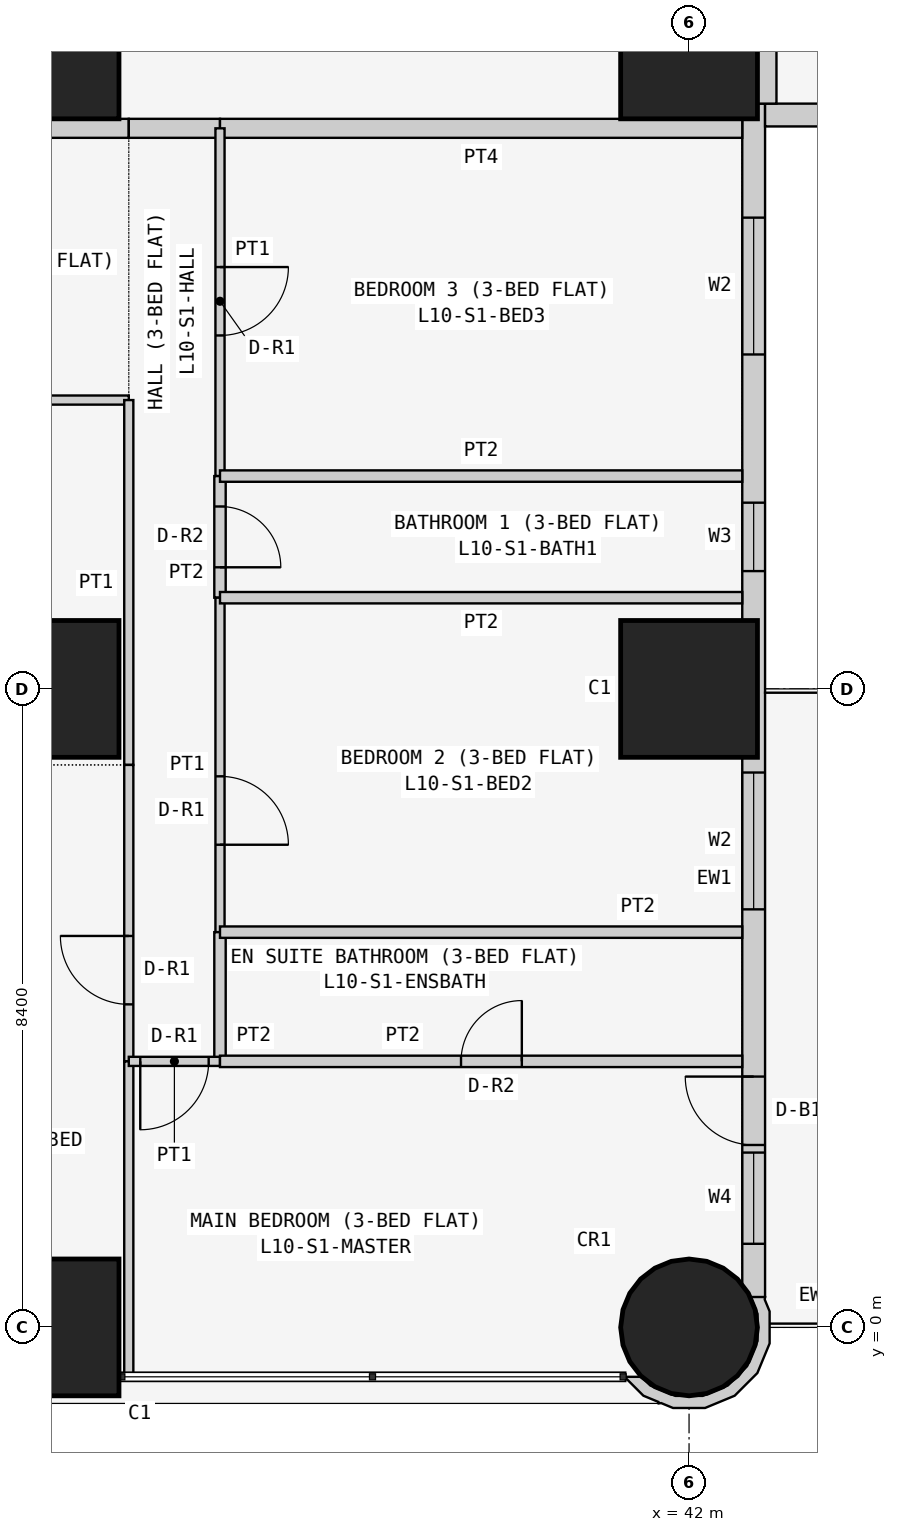
"""IFC4 building model, lengths in metres.
Left out: names, types, materials, properties, quantities, classifications, styles, units other than length and angle.
Written with IfcOpenShell. Run it as: python <this file> out.ifc"""

import sys

from ifc_helpers import new_model, si_unit, direction, frame, frame_2d, origin, origin_2d, place, context, subcontext, project, spatial, polyline, rectangle, circle, outline, extrude, element, fill, save


model = new_model("IFC4")
c1 = context("Model", 3, precision=1e-05, world=origin(), true_north=direction((0.0, 1.0)))
c2 = subcontext(c1, "Body", "Model", "MODEL_VIEW")
j1 = project(units=[si_unit("LENGTHUNIT", "METRE"), si_unit("PLANEANGLEUNIT", "RADIAN")], contexts=[c1])
p1 = place(None, origin())
s1 = spatial("IfcSite", under=j1, at=p1, CompositionType="ELEMENT")
p2 = place(p1, origin())
s2 = spatial("IfcBuilding", under=s1, at=p2, CompositionType="ELEMENT")
p3 = place(p2, frame((0.0, 0.0, 45.3)))
s3 = spatial("IfcBuildingStorey", under=s2, at=p3, CompositionType="ELEMENT", Elevation=45.3)
for number, where, z_axis, x_axis in (
    (1, (33.6, 0.0, 0.0), (0.0, 0.0, 1.0), (1.0, 0.0, 0.0)),
    (2, (33.6, 8.4, 0.0), (0.0, 0.0, 1.0), (1.0, 0.0, 0.0)),
    (3, (33.6, 16.8, 0.0), (0.0, 0.0, 1.0), (1.0, 0.0, 0.0)),
):
    element("IfcColumn", number, at=place(p3, frame(where, z_axis=z_axis, x_axis=x_axis)), inside=s3, PredefinedType="COLUMN", context=c2, shape_type="SweptSolid", body=[
        extrude(rectangle(XDim=1.8, YDim=1.8, at=origin_2d()), origin(), (0.0, 0.0, 1.0), 3.6),
    ])
p4 = place(p3, frame((42.0, 0.0, 0.0), z_axis=(0.0, 0.0, 1.0), x_axis=(1.0, 0.0, 0.0)))
e4 = element("IfcColumn", 4, at=p4, inside=s3, PredefinedType="COLUMN", context=c2, shape_type="SweptSolid", body=[
    extrude(circle(Radius=0.9, at=origin_2d()), origin(), (0.0, 0.0, 1.0), 3.6),
])
for number, where, z_axis, x_axis in (
    (5, (42.0, 8.4, 0.0), (0.0, 0.0, 1.0), (1.0, 0.0, 0.0)),
    (6, (42.0, 16.8, 0.0), (0.0, 0.0, 1.0), (1.0, 0.0, 0.0)),
):
    element("IfcColumn", number, at=place(p3, frame(where, z_axis=z_axis, x_axis=x_axis)), inside=s3, PredefinedType="COLUMN", context=c2, shape_type="SweptSolid", body=[
        extrude(rectangle(XDim=1.8, YDim=1.8, at=origin_2d()), origin(), (0.0, 0.0, 1.0), 3.6),
    ])
p5 = place(p3, frame((42.85, 0.4, 0.0), z_axis=(0.0, 0.0, 1.0), x_axis=(0.0, 1.0, 0.0)))
e7 = element("IfcWall", 7, at=p5, inside=s3, PredefinedType="SOLIDWALL", context=c2, shape_type="SweptSolid", body=[
    extrude(rectangle(XDim=15.7, YDim=0.3, at=frame_2d((7.85, 0.0))), origin(), (0.0, 0.0, 1.0), 3.45),
])
p6 = place(p5, frame((12.4, 0.0, 0.9)))
e8 = element("IfcOpeningElement", 8, at=p6, cuts=e7, PredefinedType="OPENING", context=c2, shape_type="SweptSolid", body=[
    extrude(rectangle(XDim=1.8, YDim=1.5, at=frame_2d((0.9, 0.75))), frame((0.0, 0.16, 0.0), z_axis=(0.0, -1.0, 0.0), x_axis=(1.0, 0.0, 0.0)), (0.0, 0.0, 1.0), 0.32),
])
p7 = place(p5, frame((9.55, 0.0, 1.5)))
e9 = element("IfcOpeningElement", 9, at=p7, cuts=e7, PredefinedType="OPENING", context=c2, shape_type="SweptSolid", body=[
    extrude(rectangle(XDim=0.9, YDim=0.7, at=frame_2d((0.45, 0.35))), frame((0.0, 0.16, 0.0), z_axis=(0.0, -1.0, 0.0), x_axis=(1.0, 0.0, 0.0)), (0.0, 0.0, 1.0), 0.32),
])
p8 = place(p5, frame((5.1, 0.0, 0.9)))
e10 = element("IfcOpeningElement", 10, at=p8, cuts=e7, PredefinedType="OPENING", context=c2, shape_type="SweptSolid", body=[
    extrude(rectangle(XDim=1.8, YDim=1.5, at=frame_2d((0.9, 0.75))), frame((0.0, 0.16, 0.0), z_axis=(0.0, -1.0, 0.0), x_axis=(1.0, 0.0, 0.0)), (0.0, 0.0, 1.0), 0.32),
])
p9 = place(p5, frame((2.0, 0.0, 0.0)))
e11 = element("IfcOpeningElement", 11, at=p9, cuts=e7, PredefinedType="OPENING", context=c2, shape_type="SweptSolid", body=[
    extrude(rectangle(XDim=0.9, YDim=2.4, at=frame_2d((0.45, 1.2))), frame((0.0, 0.16, 0.0), z_axis=(0.0, -1.0, 0.0), x_axis=(1.0, 0.0, 0.0)), (0.0, 0.0, 1.0), 0.32),
])
p10 = place(p5, frame((0.7, 0.0, 0.9)))
e12 = element("IfcOpeningElement", 12, at=p10, cuts=e7, PredefinedType="OPENING", context=c2, shape_type="SweptSolid", body=[
    extrude(rectangle(XDim=1.2, YDim=1.5, at=frame_2d((0.6, 0.75))), frame((0.0, 0.16, 0.0), z_axis=(0.0, -1.0, 0.0), x_axis=(1.0, 0.0, 0.0)), (0.0, 0.0, 1.0), 0.32),
])
p11 = place(p3, frame((43.0, 15.95, 0.0), z_axis=(0.0, 0.0, 1.0), x_axis=(1.0, 0.0, 0.0)))
e13 = element("IfcWall", 13, at=p11, inside=s3, PredefinedType="SOLIDWALL", context=c2, shape_type="SweptSolid", body=[
    extrude(rectangle(XDim=15.4, YDim=0.3, at=frame_2d((7.7, 0.0))), origin(), (0.0, 0.0, 1.0), 3.45),
])
p12 = place(p11, frame((1.2, 0.0, 0.9)))
e14 = element("IfcOpeningElement", 14, at=p12, cuts=e13, PredefinedType="OPENING", context=c2, shape_type="SweptSolid", body=[
    extrude(rectangle(XDim=1.8, YDim=1.5, at=frame_2d((0.9, 0.75))), frame((0.0, 0.16, 0.0), z_axis=(0.0, -1.0, 0.0), x_axis=(1.0, 0.0, 0.0)), (0.0, 0.0, 1.0), 0.32),
])
p13 = place(p11, frame((4.95, 0.0, 1.5)))
e15 = element("IfcOpeningElement", 15, at=p13, cuts=e13, PredefinedType="OPENING", context=c2, shape_type="SweptSolid", body=[
    extrude(rectangle(XDim=0.9, YDim=0.7, at=frame_2d((0.45, 0.35))), frame((0.0, 0.16, 0.0), z_axis=(0.0, -1.0, 0.0), x_axis=(1.0, 0.0, 0.0)), (0.0, 0.0, 1.0), 0.32),
])
p14 = place(p11, frame((8.5, 0.0, 0.9)))
e16 = element("IfcOpeningElement", 16, at=p14, cuts=e13, PredefinedType="OPENING", context=c2, shape_type="SweptSolid", body=[
    extrude(rectangle(XDim=1.8, YDim=1.5, at=frame_2d((0.9, 0.75))), frame((0.0, 0.16, 0.0), z_axis=(0.0, -1.0, 0.0), x_axis=(1.0, 0.0, 0.0)), (0.0, 0.0, 1.0), 0.32),
])
p15 = place(p11, frame((12.5, 0.0, 0.0)))
e17 = element("IfcOpeningElement", 17, at=p15, cuts=e13, PredefinedType="OPENING", context=c2, shape_type="SweptSolid", body=[
    extrude(rectangle(XDim=0.9, YDim=2.4, at=frame_2d((0.45, 1.2))), frame((0.0, 0.16, 0.0), z_axis=(0.0, -1.0, 0.0), x_axis=(1.0, 0.0, 0.0)), (0.0, 0.0, 1.0), 0.32),
])
p16 = place(p11, frame((13.5, 0.0, 0.9)))
e18 = element("IfcOpeningElement", 18, at=p16, cuts=e13, PredefinedType="OPENING", context=c2, shape_type="SweptSolid", body=[
    extrude(rectangle(XDim=1.2, YDim=1.5, at=frame_2d((0.6, 0.75))), frame((0.0, 0.16, 0.0), z_axis=(0.0, -1.0, 0.0), x_axis=(1.0, 0.0, 0.0)), (0.0, 0.0, 1.0), 0.32),
])
p17 = place(p3, frame((41.233, -0.611, 0.0), z_axis=(0.0, 0.0, 1.0), x_axis=(0.377204953059, -0.926129809145, 0.0)))
e19 = element("IfcWall", 19, at=p17, inside=s3, PredefinedType="SOLIDWALL", context=c2, shape_type="SweptSolid", body=[
    extrude(outline(polyline([(0.319, 1.843), (-0.072, 2.001), (-0.24, 2.001), (-0.269, 2.017), (-0.37, 1.841), (-0.102, 1.842), (0.23, 1.707), (0.485, 1.455), (0.624, 1.125), (0.626, 0.766), (0.49, 0.434), (0.239, 0.179), (0.09, 0.117), (0.011, -0.078), (0.024, -0.083), (0.33, 0.045), (0.48, 0.197), (0.499, 0.193), (0.508, 0.225), (0.626, 0.345), (0.785, 0.736), (0.782, 1.157), (0.619, 1.546), (0.319, 1.843)])), origin(), (0.0, 0.0, 1.0), 3.45),
])
p18 = place(p3, frame((43.025, 22.971, 0.0), z_axis=(0.0, 0.0, 1.0), x_axis=(0.0, -1.0, 0.0)))
e20 = element("IfcWall", 20, at=p18, inside=s3, PredefinedType="PARTITIONING", context=c2, shape_type="SweptSolid", body=[
    extrude(rectangle(XDim=6.871, YDim=0.25, at=frame_2d((3.436, 0.0))), origin(), (0.0, 0.0, 1.0), 3.45),
])
p19 = place(p3, frame((34.629, 15.775, 0.0), z_axis=(0.0, 0.0, 1.0), x_axis=(-1.0, 0.0, 0.0)))
e21 = element("IfcWall", 21, at=p19, inside=s3, PredefinedType="PARTITIONING", context=c2, shape_type="SweptSolid", body=[
    extrude(rectangle(XDim=5.229, YDim=0.25, at=frame_2d((2.615, 0.0))), origin(), (0.0, 0.0, 1.0), 3.45),
])
p20 = place(p19, frame((2.129, 0.0, 0.0)))
e22 = element("IfcOpeningElement", 22, at=p20, cuts=e21, PredefinedType="OPENING", context=c2, shape_type="SweptSolid", body=[
    extrude(rectangle(XDim=1.0, YDim=2.1, at=frame_2d((0.5, 1.05))), frame((0.0, 0.135, 0.0), z_axis=(0.0, -1.0, 0.0), x_axis=(1.0, 0.0, 0.0)), (0.0, 0.0, 1.0), 0.27),
])
p21 = place(p3, frame((35.829, 15.775, 0.0), z_axis=(0.0, 0.0, 1.0), x_axis=(-1.0, 0.0, 0.0)))
e23 = element("IfcWall", 23, at=p21, inside=s3, PredefinedType="PARTITIONING", context=c2, shape_type="SweptSolid", body=[
    extrude(rectangle(XDim=1.2, YDim=0.25, at=frame_2d((0.6, 0.0))), origin(), (0.0, 0.0, 1.0), 3.45),
])
p22 = place(p3, frame((42.7, 15.775, 0.0), z_axis=(0.0, 0.0, 1.0), x_axis=(-1.0, 0.0, 0.0)))
e24 = element("IfcWall", 24, at=p22, inside=s3, PredefinedType="PARTITIONING", context=c2, shape_type="SweptSolid", body=[
    extrude(rectangle(XDim=6.871, YDim=0.25, at=frame_2d((3.436, 0.0))), origin(), (0.0, 0.0, 1.0), 3.45),
])
p23 = place(p3, frame((29.4, 12.2, 0.0), z_axis=(0.0, 0.0, 1.0), x_axis=(1.0, 0.0, 0.0)))
e25 = element("IfcWall", 25, at=p23, inside=s3, PredefinedType="PARTITIONING", context=c2, shape_type="SweptSolid", body=[
    extrude(rectangle(XDim=5.229, YDim=0.12, at=frame_2d((2.615, 0.0))), origin(), (0.0, 0.0, 1.0), 3.45),
])
p24 = place(p23, frame((1.05, 0.0, 0.0)))
e26 = element("IfcOpeningElement", 26, at=p24, cuts=e25, PredefinedType="OPENING", context=c2, shape_type="SweptSolid", body=[
    extrude(rectangle(XDim=0.9, YDim=2.1, at=frame_2d((0.45, 1.05))), frame((0.0, 0.07, 0.0), z_axis=(0.0, -1.0, 0.0), x_axis=(1.0, 0.0, 0.0)), (0.0, 0.0, 1.0), 0.14),
])
p25 = place(p3, frame((34.629, 7.4, 0.0), z_axis=(0.0, 0.0, 1.0), x_axis=(0.0, 1.0, 0.0)))
e27 = element("IfcWall", 27, at=p25, inside=s3, PredefinedType="PARTITIONING", context=c2, shape_type="SweptSolid", body=[
    extrude(rectangle(XDim=4.8, YDim=0.12, at=frame_2d((2.4, 0.0))), origin(), (0.0, 0.0, 1.0), 3.45),
])
p26 = place(p3, frame((34.629, 3.5, 0.0), z_axis=(0.0, 0.0, 1.0), x_axis=(0.0, 1.0, 0.0)))
e28 = element("IfcWall", 28, at=p26, inside=s3, PredefinedType="PARTITIONING", context=c2, shape_type="SweptSolid", body=[
    extrude(rectangle(XDim=3.9, YDim=0.12, at=frame_2d((1.95, 0.0))), origin(), (0.0, 0.0, 1.0), 3.45),
])
p27 = place(p26, frame((0.75, 0.0, 0.0)))
e29 = element("IfcOpeningElement", 29, at=p27, cuts=e28, PredefinedType="OPENING", context=c2, shape_type="SweptSolid", body=[
    extrude(rectangle(XDim=0.9, YDim=2.1, at=frame_2d((0.45, 1.05))), frame((0.0, 0.07, 0.0), z_axis=(0.0, -1.0, 0.0), x_axis=(1.0, 0.0, 0.0)), (0.0, 0.0, 1.0), 0.14),
])
p28 = place(p3, frame((34.629, -0.65, 0.0), z_axis=(0.0, 0.0, 1.0), x_axis=(0.0, 1.0, 0.0)))
e30 = element("IfcWall", 30, at=p28, inside=s3, PredefinedType="PARTITIONING", context=c2, shape_type="SweptSolid", body=[
    extrude(rectangle(XDim=4.15, YDim=0.12, at=frame_2d((2.075, 0.0))), origin(), (0.0, 0.0, 1.0), 3.45),
])
p29 = place(p3, frame((35.829, 11.2, 0.0), z_axis=(0.0, 0.0, 1.0), x_axis=(0.0, 1.0, 0.0)))
e31 = element("IfcWall", 31, at=p29, inside=s3, PredefinedType="PARTITIONING", context=c2, shape_type="SweptSolid", body=[
    extrude(rectangle(XDim=4.575, YDim=0.12, at=frame_2d((2.288, 0.0))), origin(), (0.0, 0.0, 1.0), 3.45),
])
p30 = place(p29, frame((1.85, 0.0, 0.0)))
e32 = element("IfcOpeningElement", 32, at=p30, cuts=e31, PredefinedType="OPENING", context=c2, shape_type="SweptSolid", body=[
    extrude(rectangle(XDim=0.9, YDim=2.1, at=frame_2d((0.45, 1.05))), frame((0.0, 0.07, 0.0), z_axis=(0.0, -1.0, 0.0), x_axis=(1.0, 0.0, 0.0)), (0.0, 0.0, 1.0), 0.14),
])
p31 = place(p3, frame((35.829, 9.6, 0.0), z_axis=(0.0, 0.0, 1.0), x_axis=(0.0, 1.0, 0.0)))
e33 = element("IfcWall", 33, at=p31, inside=s3, PredefinedType="PARTITIONING", context=c2, shape_type="SweptSolid", body=[
    extrude(rectangle(XDim=1.6, YDim=0.15, at=frame_2d((0.8, 0.0))), origin(), (0.0, 0.0, 1.0), 3.45),
])
p32 = place(p31, frame((0.4, 0.0, 0.0)))
e34 = element("IfcOpeningElement", 34, at=p32, cuts=e33, PredefinedType="OPENING", context=c2, shape_type="SweptSolid", body=[
    extrude(rectangle(XDim=0.8, YDim=2.1, at=frame_2d((0.4, 1.05))), frame((0.0, 0.085, 0.0), z_axis=(0.0, -1.0, 0.0), x_axis=(1.0, 0.0, 0.0)), (0.0, 0.0, 1.0), 0.17),
])
p33 = place(p3, frame((35.829, 5.2, 0.0), z_axis=(0.0, 0.0, 1.0), x_axis=(0.0, 1.0, 0.0)))
e35 = element("IfcWall", 35, at=p33, inside=s3, PredefinedType="PARTITIONING", context=c2, shape_type="SweptSolid", body=[
    extrude(rectangle(XDim=4.4, YDim=0.12, at=frame_2d((2.2, 0.0))), origin(), (0.0, 0.0, 1.0), 3.45),
])
p34 = place(p33, frame((1.15, 0.0, 0.0)))
e36 = element("IfcOpeningElement", 36, at=p34, cuts=e35, PredefinedType="OPENING", context=c2, shape_type="SweptSolid", body=[
    extrude(rectangle(XDim=0.9, YDim=2.1, at=frame_2d((0.45, 1.05))), frame((0.0, 0.07, 0.0), z_axis=(0.0, -1.0, 0.0), x_axis=(1.0, 0.0, 0.0)), (0.0, 0.0, 1.0), 0.14),
])
p35 = place(p3, frame((35.829, 3.5, 0.0), z_axis=(0.0, 0.0, 1.0), x_axis=(0.0, 1.0, 0.0)))
e37 = element("IfcWall", 37, at=p35, inside=s3, PredefinedType="PARTITIONING", context=c2, shape_type="SweptSolid", body=[
    extrude(rectangle(XDim=1.7, YDim=0.15, at=frame_2d((0.85, 0.0))), origin(), (0.0, 0.0, 1.0), 3.45),
])
p36 = place(p3, frame((34.629, 3.5, 0.0), z_axis=(0.0, 0.0, 1.0), x_axis=(1.0, 0.0, 0.0)))
e38 = element("IfcWall", 38, at=p36, inside=s3, PredefinedType="PARTITIONING", context=c2, shape_type="SweptSolid", body=[
    extrude(rectangle(XDim=1.2, YDim=0.12, at=frame_2d((0.6, 0.0))), origin(), (0.0, 0.0, 1.0), 3.45),
])
p37 = place(p36, frame((0.151, 0.0, 0.0)))
e39 = element("IfcOpeningElement", 39, at=p37, cuts=e38, PredefinedType="OPENING", context=c2, shape_type="SweptSolid", body=[
    extrude(rectangle(XDim=0.9, YDim=2.1, at=frame_2d((0.45, 1.05))), frame((0.0, 0.07, 0.0), z_axis=(0.0, -1.0, 0.0), x_axis=(1.0, 0.0, 0.0)), (0.0, 0.0, 1.0), 0.14),
])
for number, where, z_axis, x_axis in (
    (40, (35.829, 11.2, 0.0), (0.0, 0.0, 1.0), (1.0, 0.0, 0.0)),
    (41, (35.829, 9.6, 0.0), (0.0, 0.0, 1.0), (1.0, 0.0, 0.0)),
    (42, (35.829, 5.2, 0.0), (0.0, 0.0, 1.0), (1.0, 0.0, 0.0)),
):
    element("IfcWall", number, at=place(p3, frame(where, z_axis=z_axis, x_axis=x_axis)), inside=s3, PredefinedType="PARTITIONING", context=c2, shape_type="SweptSolid", body=[
        extrude(rectangle(XDim=6.871, YDim=0.15, at=frame_2d((3.436, 0.0))), origin(), (0.0, 0.0, 1.0), 3.45),
    ])
p38 = place(p3, frame((35.829, 3.5, 0.0), z_axis=(0.0, 0.0, 1.0), x_axis=(1.0, 0.0, 0.0)))
e43 = element("IfcWall", 43, at=p38, inside=s3, PredefinedType="PARTITIONING", context=c2, shape_type="SweptSolid", body=[
    extrude(rectangle(XDim=6.871, YDim=0.15, at=frame_2d((3.436, 0.0))), origin(), (0.0, 0.0, 1.0), 3.45),
])
p39 = place(p38, frame((3.171, 0.0, 0.0)))
e44 = element("IfcOpeningElement", 44, at=p39, cuts=e43, PredefinedType="OPENING", context=c2, shape_type="SweptSolid", body=[
    extrude(rectangle(XDim=0.8, YDim=2.1, at=frame_2d((0.4, 1.05))), frame((0.0, 0.085, 0.0), z_axis=(0.0, -1.0, 0.0), x_axis=(1.0, 0.0, 0.0)), (0.0, 0.0, 1.0), 0.17),
])
p40 = place(p6, origin())
e45 = element("IfcWindow", 45, at=p40, inside=s3, PartitioningType="SINGLE_PANEL", PredefinedType="WINDOW", context=c2, shape_type="SweptSolid", body=[
    extrude(rectangle(XDim=1.8, YDim=1.5, at=frame_2d((0.9, 0.75))), frame((0.0, 0.03, 0.0), z_axis=(0.0, -1.0, 0.0), x_axis=(1.0, 0.0, 0.0)), (0.0, 0.0, 1.0), 0.06),
])
fill(e8, e45)
p41 = place(p7, origin())
e46 = element("IfcWindow", 46, at=p41, inside=s3, PartitioningType="SINGLE_PANEL", PredefinedType="WINDOW", context=c2, shape_type="SweptSolid", body=[
    extrude(rectangle(XDim=0.9, YDim=0.7, at=frame_2d((0.45, 0.35))), frame((0.0, 0.03, 0.0), z_axis=(0.0, -1.0, 0.0), x_axis=(1.0, 0.0, 0.0)), (0.0, 0.0, 1.0), 0.06),
])
fill(e9, e46)
p42 = place(p8, origin())
e47 = element("IfcWindow", 47, at=p42, inside=s3, PartitioningType="SINGLE_PANEL", PredefinedType="WINDOW", context=c2, shape_type="SweptSolid", body=[
    extrude(rectangle(XDim=1.8, YDim=1.5, at=frame_2d((0.9, 0.75))), frame((0.0, 0.03, 0.0), z_axis=(0.0, -1.0, 0.0), x_axis=(1.0, 0.0, 0.0)), (0.0, 0.0, 1.0), 0.06),
])
fill(e10, e47)
p43 = place(p9, origin())
e48 = element("IfcDoor", 48, at=p43, inside=s3, OperationType="SINGLE_SWING_RIGHT", PredefinedType="DOOR", context=c2, shape_type="SweptSolid", body=[
    extrude(rectangle(XDim=0.9, YDim=2.4, at=frame_2d((0.45, 1.2))), frame((0.0, 0.025, 0.0), z_axis=(0.0, -1.0, 0.0), x_axis=(1.0, 0.0, 0.0)), (0.0, 0.0, 1.0), 0.05),
])
fill(e11, e48)
p44 = place(p10, origin())
e49 = element("IfcWindow", 49, at=p44, inside=s3, PartitioningType="SINGLE_PANEL", PredefinedType="WINDOW", context=c2, shape_type="SweptSolid", body=[
    extrude(rectangle(XDim=1.2, YDim=1.5, at=frame_2d((0.6, 0.75))), frame((0.0, 0.03, 0.0), z_axis=(0.0, -1.0, 0.0), x_axis=(1.0, 0.0, 0.0)), (0.0, 0.0, 1.0), 0.06),
])
fill(e12, e49)
p45 = place(p27, origin())
e50 = element("IfcDoor", 50, at=p45, inside=s3, OperationType="SINGLE_SWING_RIGHT", PredefinedType="DOOR", context=c2, shape_type="SweptSolid", body=[
    extrude(rectangle(XDim=0.9, YDim=2.1, at=frame_2d((0.45, 1.05))), frame((0.0, 0.025, 0.0), z_axis=(0.0, -1.0, 0.0), x_axis=(1.0, 0.0, 0.0)), (0.0, 0.0, 1.0), 0.05),
])
fill(e29, e50)
p46 = place(p30, frame((0.9, 0.0, 0.0), z_axis=(0.0, 0.0, 1.0), x_axis=(-1.0, 0.0, 0.0)))
e51 = element("IfcDoor", 51, at=p46, inside=s3, OperationType="SINGLE_SWING_LEFT", PredefinedType="DOOR", context=c2, shape_type="SweptSolid", body=[
    extrude(rectangle(XDim=0.9, YDim=2.1, at=frame_2d((0.45, 1.05))), frame((0.0, 0.025, 0.0), z_axis=(0.0, -1.0, 0.0), x_axis=(1.0, 0.0, 0.0)), (0.0, 0.0, 1.0), 0.05),
])
fill(e32, e51)
p47 = place(p32, frame((0.8, 0.0, 0.0), z_axis=(0.0, 0.0, 1.0), x_axis=(-1.0, 0.0, 0.0)))
e52 = element("IfcDoor", 52, at=p47, inside=s3, OperationType="SINGLE_SWING_RIGHT", PredefinedType="DOOR", context=c2, shape_type="SweptSolid", body=[
    extrude(rectangle(XDim=0.8, YDim=2.1, at=frame_2d((0.4, 1.05))), frame((0.0, 0.025, 0.0), z_axis=(0.0, -1.0, 0.0), x_axis=(1.0, 0.0, 0.0)), (0.0, 0.0, 1.0), 0.05),
])
fill(e34, e52)
p48 = place(p34, frame((0.9, 0.0, 0.0), z_axis=(0.0, 0.0, 1.0), x_axis=(-1.0, 0.0, 0.0)))
e53 = element("IfcDoor", 53, at=p48, inside=s3, OperationType="SINGLE_SWING_RIGHT", PredefinedType="DOOR", context=c2, shape_type="SweptSolid", body=[
    extrude(rectangle(XDim=0.9, YDim=2.1, at=frame_2d((0.45, 1.05))), frame((0.0, 0.025, 0.0), z_axis=(0.0, -1.0, 0.0), x_axis=(1.0, 0.0, 0.0)), (0.0, 0.0, 1.0), 0.05),
])
fill(e36, e53)
p49 = place(p37, frame((0.9, 0.0, 0.0), z_axis=(0.0, 0.0, 1.0), x_axis=(-1.0, 0.0, 0.0)))
e54 = element("IfcDoor", 54, at=p49, inside=s3, OperationType="SINGLE_SWING_RIGHT", PredefinedType="DOOR", context=c2, shape_type="SweptSolid", body=[
    extrude(rectangle(XDim=0.9, YDim=2.1, at=frame_2d((0.45, 1.05))), frame((0.0, 0.025, 0.0), z_axis=(0.0, -1.0, 0.0), x_axis=(1.0, 0.0, 0.0)), (0.0, 0.0, 1.0), 0.05),
])
fill(e39, e54)
p50 = place(p39, origin())
e55 = element("IfcDoor", 55, at=p50, inside=s3, OperationType="SINGLE_SWING_RIGHT", PredefinedType="DOOR", context=c2, shape_type="SweptSolid", body=[
    extrude(rectangle(XDim=0.8, YDim=2.1, at=frame_2d((0.4, 1.05))), frame((0.0, 0.025, 0.0), z_axis=(0.0, -1.0, 0.0), x_axis=(1.0, 0.0, 0.0)), (0.0, 0.0, 1.0), 0.05),
])
fill(e44, e55)
save(model, sys.argv[1])
